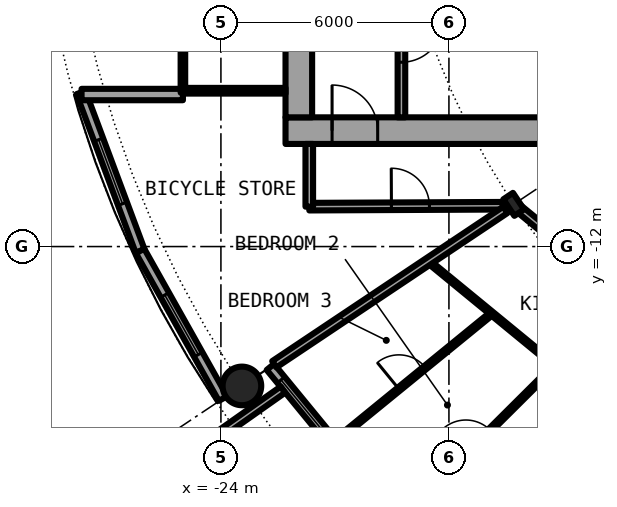
"""IFC4 building model, lengths in metres.
Left out: names, types, materials, properties, quantities, classifications, styles, units other than length and angle.
Written with IfcOpenShell. Run it as: python <this file> out.ifc"""

import sys

from ifc_helpers import new_model, si_unit, direction, frame, frame_2d, origin, origin_2d, place, context, subcontext, project, spatial, rectangle, hollow_circle, i_section, extrude, element, fill, save


model = new_model("IFC4")
c1 = context("Model", 3, precision=1e-05, world=origin(), true_north=direction((0.0, 1.0)))
c2 = subcontext(c1, "Body", "Model", "MODEL_VIEW")
j1 = project(units=[si_unit("LENGTHUNIT", "METRE"), si_unit("PLANEANGLEUNIT", "RADIAN")], contexts=[c1])
p1 = place(None, origin())
s1 = spatial("IfcSite", under=j1, at=p1, CompositionType="ELEMENT")
p2 = place(p1, origin())
s2 = spatial("IfcBuilding", under=s1, at=p2, CompositionType="ELEMENT")
p3 = place(p2, frame((0.0, 0.0, 91.05)))
s3 = spatial("IfcBuildingStorey", under=s2, at=p3, CompositionType="ELEMENT", Elevation=91.05)
p4 = place(p3, frame((-23.448, -15.667, 0.0), z_axis=(0.0, 0.0, 1.0), x_axis=(1.0, 0.0, 0.0)))
e1 = element("IfcColumn", 1, at=p4, inside=s3, PredefinedType="COLUMN", context=c2, shape_type="SweptSolid", body=[
    extrude(hollow_circle(Radius=0.508, WallThickness=0.04, at=origin_2d()), origin(), (0.0, 0.0, 1.0), 3.05),
])
p5 = place(p3, frame((-16.297, -10.889, 0.0), z_axis=(0.0, 0.0, 1.0), x_axis=(-0.831469612303, -0.55557023302, 0.0)))
e2 = element("IfcColumn", 2, at=p5, inside=s3, PredefinedType="COLUMN", context=c2, shape_type="SweptSolid", body=[
    extrude(i_section(OverallWidth=0.306, OverallDepth=0.524, WebThickness=0.021, FlangeThickness=0.04, FilletRadius=0.027, at=origin_2d()), origin(), (0.0, 0.0, 1.0), 3.05),
])
p6 = place(p3, frame((-22.699, -15.167, 0.0), z_axis=(0.0, 0.0, 1.0), x_axis=(0.634382322723, -0.773019449054, 0.0)))
e3 = element("IfcWall", 3, at=p6, inside=s3, PredefinedType="SOLIDWALL", context=c2, shape_type="SweptSolid", body=[
    extrude(rectangle(XDim=5.352, YDim=0.25, at=frame_2d((2.676, 0.0))), origin(), (0.0, 0.0, 1.0), 2.7),
])
p7 = place(p6, frame((0.441, 0.0, 0.3)))
e4 = element("IfcOpeningElement", 4, at=p7, cuts=e3, PredefinedType="OPENING", context=c2, shape_type="SweptSolid", body=[
    extrude(rectangle(XDim=1.8, YDim=2.1, at=frame_2d((0.9, 1.05))), frame((0.0, 0.135, 0.0), z_axis=(0.0, -1.0, 0.0), x_axis=(1.0, 0.0, 0.0)), (0.0, 0.0, 1.0), 0.27),
])
p8 = place(p6, frame((3.51, 0.0, 0.0)))
e5 = element("IfcOpeningElement", 5, at=p8, cuts=e3, PredefinedType="OPENING", context=c2, shape_type="SweptSolid", body=[
    extrude(rectangle(XDim=1.0, YDim=2.2, at=frame_2d((0.5, 1.1))), frame((0.0, 0.135, 0.0), z_axis=(0.0, -1.0, 0.0), x_axis=(1.0, 0.0, 0.0)), (0.0, 0.0, 1.0), 0.27),
])
p9 = place(p3, frame((-22.37, -15.765, -0.03), z_axis=(0.0, 0.0, 1.0), x_axis=(-0.817256123454, -0.576274612209, 0.0)))
e6 = element("IfcWall", 6, at=p9, inside=s3, PredefinedType="SOLIDWALL", context=c2, shape_type="SweptSolid", body=[
    extrude(rectangle(XDim=2.933, YDim=0.2, at=frame_2d((1.466, 0.0))), origin(), (0.0, 0.0, 1.0), 2.73),
])
p10 = place(p3, frame((-27.682, -7.945, 0.0), z_axis=(0.0, 0.0, 1.0), x_axis=(0.349247811493, -0.937030397675, 0.0)))
e7 = element("IfcWall", 7, at=p10, inside=s3, PredefinedType="SOLIDWALL", context=c2, shape_type="SweptSolid", body=[
    extrude(rectangle(XDim=4.452, YDim=0.25, at=frame_2d((2.226, 0.0))), origin(), (0.0, 0.0, 1.0), 2.7),
])
p11 = place(p10, frame((1.327, 0.0, 0.3)))
e8 = element("IfcOpeningElement", 8, at=p11, cuts=e7, PredefinedType="OPENING", context=c2, shape_type="SweptSolid", body=[
    extrude(rectangle(XDim=1.8, YDim=2.1, at=frame_2d((0.9, 1.05))), frame((0.0, 0.135, 0.0), z_axis=(0.0, -1.0, 0.0), x_axis=(1.0, 0.0, 0.0)), (0.0, 0.0, 1.0), 0.27),
])
p12 = place(p3, frame((-26.127, -12.117, 0.0), z_axis=(0.0, 0.0, 1.0), x_axis=(0.489696356642, -0.871893042919, 0.0)))
e9 = element("IfcWall", 9, at=p12, inside=s3, PredefinedType="SOLIDWALL", context=c2, shape_type="SweptSolid", body=[
    extrude(rectangle(XDim=4.454, YDim=0.25, at=frame_2d((2.227, 0.0))), origin(), (0.0, 0.0, 1.0), 2.7),
])
p13 = place(p12, frame((1.327, 0.0, 0.3)))
e10 = element("IfcOpeningElement", 10, at=p13, cuts=e9, PredefinedType="OPENING", context=c2, shape_type="SweptSolid", body=[
    extrude(rectangle(XDim=1.8, YDim=2.1, at=frame_2d((0.9, 1.05))), frame((0.0, 0.135, 0.0), z_axis=(0.0, -1.0, 0.0), x_axis=(1.0, 0.0, 0.0)), (0.0, 0.0, 1.0), 0.27),
])
p14 = place(p3, frame((-25.0, -8.0, 0.0), z_axis=(0.0, 0.0, 1.0), x_axis=(-1.0, 0.0, 0.0)))
e11 = element("IfcWall", 11, at=p14, inside=s3, PredefinedType="SOLIDWALL", context=c2, shape_type="SweptSolid", body=[
    extrude(rectangle(XDim=2.667, YDim=0.3, at=frame_2d((1.333, 0.0))), origin(), (0.0, 0.0, 1.0), 2.7),
])
p15 = place(p3, frame((-22.3, -8.95, 0.0), z_axis=(0.0, 0.0, 1.0), x_axis=(1.0, 0.0, 0.0)))
e12 = element("IfcWall", 12, at=p15, inside=s3, PredefinedType="SHEAR", context=c2, shape_type="SweptSolid", body=[
    extrude(rectangle(XDim=14.0, YDim=0.7, at=frame_2d((7.0, 0.0))), origin(), (0.0, 0.0, 1.0), 3.05),
])
p16 = place(p15, frame((1.225, 0.0, 0.0)))
e13 = element("IfcOpeningElement", 13, at=p16, cuts=e12, PredefinedType="OPENING", context=c2, shape_type="SweptSolid", body=[
    extrude(rectangle(XDim=1.2, YDim=2.3, at=frame_2d((0.6, 1.15))), frame((0.0, 0.36, 0.0), z_axis=(0.0, -1.0, 0.0), x_axis=(1.0, 0.0, 0.0)), (0.0, 0.0, 1.0), 0.72),
])
p17 = place(p3, frame((-21.95, -8.6, 0.0), z_axis=(0.0, 0.0, 1.0), x_axis=(0.0, 1.0, 0.0)))
e14 = element("IfcWall", 14, at=p17, inside=s3, PredefinedType="SHEAR", context=c2, shape_type="SweptSolid", body=[
    extrude(rectangle(XDim=17.2, YDim=0.7, at=frame_2d((8.6, 0.0))), origin(), (0.0, 0.0, 1.0), 3.05),
])
p18 = place(p17, frame((7.7, 0.0, 0.0)))
e15 = element("IfcOpeningElement", 15, at=p18, cuts=e14, PredefinedType="OPENING", context=c2, shape_type="SweptSolid", body=[
    extrude(rectangle(XDim=1.8, YDim=2.3, at=frame_2d((0.9, 1.15))), frame((0.0, 0.36, 0.0), z_axis=(0.0, -1.0, 0.0), x_axis=(1.0, 0.0, 0.0)), (0.0, 0.0, 1.0), 0.72),
])
p19 = place(p3, frame((-19.25, -1.575, 0.0), z_axis=(0.0, 0.0, 1.0), x_axis=(0.0, -1.0, 0.0)))
e16 = element("IfcWall", 16, at=p19, inside=s3, PredefinedType="SOLIDWALL", context=c2, shape_type="SweptSolid", body=[
    extrude(rectangle(XDim=7.025, YDim=0.2, at=frame_2d((3.513, 0.0))), origin(), (0.0, 0.0, 1.0), 2.7),
])
p20 = place(p19, frame((4.475, 0.0, 0.0)))
e17 = element("IfcOpeningElement", 17, at=p20, cuts=e16, PredefinedType="OPENING", context=c2, shape_type="SweptSolid", body=[
    extrude(rectangle(XDim=1.1, YDim=2.3, at=frame_2d((0.55, 1.15))), frame((0.0, 0.11, 0.0), z_axis=(0.0, -1.0, 0.0), x_axis=(1.0, 0.0, 0.0)), (0.0, 0.0, 1.0), 0.22),
])
p21 = place(p3, frame((-22.3, -7.9, 0.0), z_axis=(0.0, 0.0, 1.0), x_axis=(-1.0, 0.0, 0.0)))
e18 = element("IfcWall", 18, at=p21, inside=s3, PredefinedType="PARTITIONING", context=c2, shape_type="SweptSolid", body=[
    extrude(rectangle(XDim=2.64, YDim=0.15, at=frame_2d((1.32, 0.0))), origin(), (0.0, 0.0, 1.0), 2.7),
])
p22 = place(p3, frame((-25.0, 7.95, 0.0), z_axis=(0.0, 0.0, 1.0), x_axis=(0.0, -1.0, 0.0)))
e19 = element("IfcWall", 19, at=p22, inside=s3, PredefinedType="PARTITIONING", context=c2, shape_type="SweptSolid", body=[
    extrude(rectangle(XDim=15.9, YDim=0.12, at=frame_2d((7.95, 0.0))), origin(), (0.0, 0.0, 1.0), 2.7),
])
p23 = place(p22, frame((0.95, 0.0, 0.1)))
e20 = element("IfcOpeningElement", 20, at=p23, cuts=e19, PredefinedType="OPENING", context=c2, shape_type="SweptSolid", body=[
    extrude(rectangle(XDim=14.0, YDim=2.35, at=frame_2d((7.0, 1.175))), frame((0.0, 0.07, 0.0), z_axis=(0.0, -1.0, 0.0), x_axis=(1.0, 0.0, 0.0)), (0.0, 0.0, 1.0), 0.14),
])
p24 = place(p3, frame((-18.542, -12.389, 0.0), z_axis=(0.0, 0.0, 1.0), x_axis=(0.77296666644, -0.634446634929, 0.0)))
e21 = element("IfcWall", 21, at=p24, inside=s3, PredefinedType="PARTITIONING", context=c2, shape_type="SweptSolid", body=[
    extrude(rectangle(XDim=6.474, YDim=0.1, at=frame_2d((3.237, 0.0))), origin(), (0.0, 0.0, 1.0), 2.7),
])
p25 = place(p3, frame((-16.173, -10.991, 0.0), z_axis=(0.0, 0.0, 1.0), x_axis=(0.773013989296, -0.634388975591, 0.0)))
e22 = element("IfcWall", 22, at=p25, inside=s3, PredefinedType="PARTITIONING", context=c2, shape_type="SweptSolid", body=[
    extrude(rectangle(XDim=11.219, YDim=0.2, at=frame_2d((5.609, 0.0))), origin(), (0.0, 0.0, 1.0), 2.38),
])
p26 = place(p25, frame((6.278, 0.0, 0.0)))
e23 = element("IfcOpeningElement", 23, at=p26, cuts=e22, PredefinedType="OPENING", context=c2, shape_type="SweptSolid", body=[
    extrude(rectangle(XDim=1.0, YDim=2.3, at=frame_2d((0.5, 1.15))), frame((0.0, 0.11, 0.0), z_axis=(0.0, -1.0, 0.0), x_axis=(1.0, 0.0, 0.0)), (0.0, 0.0, 1.0), 0.22),
])
p27 = place(p3, frame((-21.675, -10.95, 0.0), z_axis=(0.0, 0.0, 1.0), x_axis=(0.999988944514, 0.004702217579, 0.0)))
e24 = element("IfcWall", 24, at=p27, inside=s3, PredefinedType="PARTITIONING", context=c2, shape_type="SweptSolid", body=[
    extrude(rectangle(XDim=5.088, YDim=0.2, at=frame_2d((2.544, 0.0))), origin(), (0.0, 0.0, 1.0), 2.7),
])
p28 = place(p27, frame((2.162, 0.0, 0.0)))
e25 = element("IfcOpeningElement", 25, at=p28, cuts=e24, PredefinedType="OPENING", context=c2, shape_type="SweptSolid", body=[
    extrude(rectangle(XDim=1.0, YDim=2.3, at=frame_2d((0.5, 1.15))), frame((0.0, 0.11, 0.0), z_axis=(0.0, -1.0, 0.0), x_axis=(1.0, 0.0, 0.0)), (0.0, 0.0, 1.0), 0.22),
])
p29 = place(p3, frame((-22.595, -15.097, 0.0), z_axis=(0.0, 0.0, 1.0), x_axis=(0.831505405283, 0.555516661303, 0.0)))
e26 = element("IfcWall", 26, at=p29, inside=s3, PredefinedType="PARTITIONING", context=c2, shape_type="SweptSolid", body=[
    extrude(rectangle(XDim=7.312, YDim=0.2, at=frame_2d((3.656, 0.0))), origin(), (0.0, 0.0, 1.0), 2.7),
])
p30 = place(p3, frame((-21.061, -17.173, 0.0), z_axis=(0.0, 0.0, 1.0), x_axis=(0.774926754572, 0.632051046236, 0.0)))
e27 = element("IfcWall", 27, at=p30, inside=s3, PredefinedType="PARTITIONING", context=c2, shape_type="SweptSolid", body=[
    extrude(rectangle(XDim=5.403, YDim=0.1, at=frame_2d((2.702, 0.0))), origin(), (0.0, 0.0, 1.0), 2.7),
])
p31 = place(p30, frame((2.252, 0.0, 0.0)))
e28 = element("IfcOpeningElement", 28, at=p31, cuts=e27, PredefinedType="OPENING", context=c2, shape_type="SweptSolid", body=[
    extrude(rectangle(XDim=0.9, YDim=2.3, at=frame_2d((0.45, 1.15))), frame((0.0, 0.06, 0.0), z_axis=(0.0, -1.0, 0.0), x_axis=(1.0, 0.0, 0.0)), (0.0, 0.0, 1.0), 0.12),
])
p32 = place(p3, frame((-19.265, -19.166, 0.0), z_axis=(0.0, 0.0, 1.0), x_axis=(0.708831450128, 0.705377895393, 0.0)))
e29 = element("IfcWall", 29, at=p32, inside=s3, PredefinedType="PARTITIONING", context=c2, shape_type="SweptSolid", body=[
    extrude(rectangle(XDim=5.726, YDim=0.1, at=frame_2d((2.863, 0.0))), origin(), (0.0, 0.0, 1.0), 2.7),
])
p33 = place(p32, frame((2.413, 0.0, 0.0)))
e30 = element("IfcOpeningElement", 30, at=p33, cuts=e29, PredefinedType="OPENING", context=c2, shape_type="SweptSolid", body=[
    extrude(rectangle(XDim=0.9, YDim=2.3, at=frame_2d((0.45, 1.15))), frame((0.0, 0.06, 0.0), z_axis=(0.0, -1.0, 0.0), x_axis=(1.0, 0.0, 0.0)), (0.0, 0.0, 1.0), 0.12),
])
p34 = place(p3, frame((-17.241, -21.006, 0.0), z_axis=(0.0, 0.0, 1.0), x_axis=(0.634522338131, 0.772904523478, 0.0)))
e31 = element("IfcWall", 31, at=p34, inside=s3, PredefinedType="PARTITIONING", context=c2, shape_type="SweptSolid", body=[
    extrude(rectangle(XDim=8.419, YDim=0.1, at=frame_2d((4.209, 0.0))), origin(), (0.0, 0.0, 1.0), 2.7),
])
p35 = place(p34, frame((6.677, 0.0, 0.0)))
e32 = element("IfcOpeningElement", 32, at=p35, cuts=e31, PredefinedType="OPENING", context=c2, shape_type="SweptSolid", body=[
    extrude(rectangle(XDim=0.9, YDim=2.3, at=frame_2d((0.45, 1.15))), frame((0.0, 0.06, 0.0), z_axis=(0.0, -1.0, 0.0), x_axis=(1.0, 0.0, 0.0)), (0.0, 0.0, 1.0), 0.12),
])
p36 = place(p34, frame((2.466, 0.0, 0.0)))
e33 = element("IfcOpeningElement", 33, at=p36, cuts=e31, PredefinedType="OPENING", context=c2, shape_type="SweptSolid", body=[
    extrude(rectangle(XDim=0.9, YDim=2.3, at=frame_2d((0.45, 1.15))), frame((0.0, 0.06, 0.0), z_axis=(0.0, -1.0, 0.0), x_axis=(1.0, 0.0, 0.0)), (0.0, 0.0, 1.0), 0.12),
])
p37 = place(p3, frame((-21.675, -10.95, 0.0), z_axis=(0.0, 0.0, 1.0), x_axis=(0.0, 1.0, 0.0)))
e34 = element("IfcWall", 34, at=p37, inside=s3, PredefinedType="PARTITIONING", context=c2, shape_type="SweptSolid", body=[
    extrude(rectangle(XDim=1.65, YDim=0.2, at=frame_2d((0.825, 0.0))), origin(), (0.0, 0.0, 1.0), 2.7),
])
p38 = place(p7, origin())
e35 = element("IfcWindow", 35, at=p38, inside=s3, PartitioningType="SINGLE_PANEL", PredefinedType="WINDOW", context=c2, shape_type="SweptSolid", body=[
    extrude(rectangle(XDim=1.8, YDim=2.1, at=frame_2d((0.9, 1.05))), frame((0.0, 0.03, 0.0), z_axis=(0.0, -1.0, 0.0), x_axis=(1.0, 0.0, 0.0)), (0.0, 0.0, 1.0), 0.06),
])
fill(e4, e35)
p39 = place(p11, origin())
e36 = element("IfcWindow", 36, at=p39, inside=s3, PartitioningType="SINGLE_PANEL", PredefinedType="WINDOW", context=c2, shape_type="SweptSolid", body=[
    extrude(rectangle(XDim=1.8, YDim=2.1, at=frame_2d((0.9, 1.05))), frame((0.0, 0.03, 0.0), z_axis=(0.0, -1.0, 0.0), x_axis=(1.0, 0.0, 0.0)), (0.0, 0.0, 1.0), 0.06),
])
fill(e8, e36)
p40 = place(p13, origin())
e37 = element("IfcWindow", 37, at=p40, inside=s3, PartitioningType="SINGLE_PANEL", PredefinedType="WINDOW", context=c2, shape_type="SweptSolid", body=[
    extrude(rectangle(XDim=1.8, YDim=2.1, at=frame_2d((0.9, 1.05))), frame((0.0, 0.03, 0.0), z_axis=(0.0, -1.0, 0.0), x_axis=(1.0, 0.0, 0.0)), (0.0, 0.0, 1.0), 0.06),
])
fill(e10, e37)
p41 = place(p20, origin())
e38 = element("IfcDoor", 38, at=p41, inside=s3, OperationType="SINGLE_SWING_LEFT", PredefinedType="DOOR", context=c2, shape_type="SweptSolid", body=[
    extrude(rectangle(XDim=1.1, YDim=2.3, at=frame_2d((0.55, 1.15))), frame((0.0, 0.025, 0.0), z_axis=(0.0, -1.0, 0.0), x_axis=(1.0, 0.0, 0.0)), (0.0, 0.0, 1.0), 0.05),
])
fill(e17, e38)
p42 = place(p16, origin())
e39 = element("IfcDoor", 39, at=p42, inside=s3, OperationType="SINGLE_SWING_RIGHT", PredefinedType="DOOR", context=c2, shape_type="SweptSolid", body=[
    extrude(rectangle(XDim=1.2, YDim=2.3, at=frame_2d((0.6, 1.15))), frame((0.0, 0.025, 0.0), z_axis=(0.0, -1.0, 0.0), x_axis=(1.0, 0.0, 0.0)), (0.0, 0.0, 1.0), 0.05),
])
fill(e13, e39)
p43 = place(p23, origin())
e40 = element("IfcWindow", 40, at=p43, inside=s3, PartitioningType="SINGLE_PANEL", PredefinedType="WINDOW", context=c2, shape_type="SweptSolid", body=[
    extrude(rectangle(XDim=14.0, YDim=2.35, at=frame_2d((7.0, 1.175))), frame((0.0, 0.03, 0.0), z_axis=(0.0, -1.0, 0.0), x_axis=(1.0, 0.0, 0.0)), (0.0, 0.0, 1.0), 0.06),
])
fill(e20, e40)
p44 = place(p31, origin())
e41 = element("IfcDoor", 41, at=p44, inside=s3, OperationType="SINGLE_SWING_RIGHT", PredefinedType="DOOR", context=c2, shape_type="SweptSolid", body=[
    extrude(rectangle(XDim=0.9, YDim=2.3, at=frame_2d((0.45, 1.15))), frame((0.0, 0.025, 0.0), z_axis=(0.0, -1.0, 0.0), x_axis=(1.0, 0.0, 0.0)), (0.0, 0.0, 1.0), 0.05),
])
fill(e28, e41)
p45 = place(p28, origin())
e42 = element("IfcDoor", 42, at=p45, inside=s3, OperationType="SINGLE_SWING_RIGHT", PredefinedType="DOOR", context=c2, shape_type="SweptSolid", body=[
    extrude(rectangle(XDim=1.0, YDim=2.3, at=frame_2d((0.5, 1.15))), frame((0.0, 0.025, 0.0), z_axis=(0.0, -1.0, 0.0), x_axis=(1.0, 0.0, 0.0)), (0.0, 0.0, 1.0), 0.05),
])
fill(e25, e42)
save(model, sys.argv[1])
